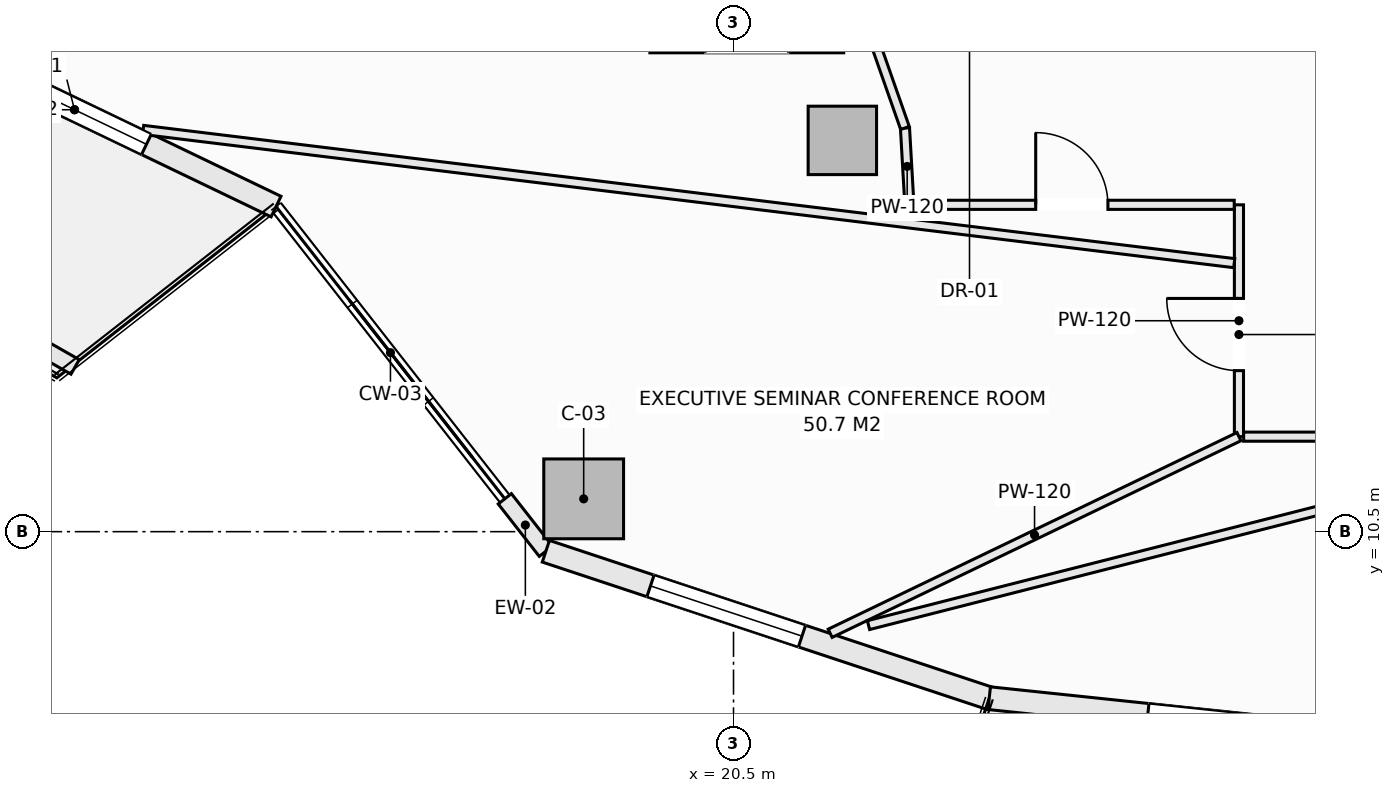
"""IFC4 building model, lengths in metres.
Left out: names, types, materials, properties, quantities, classifications, styles, units other than length and angle.
Written with IfcOpenShell. Run it as: python <this file> out.ifc"""

import sys

from ifc_helpers import new_model, si_unit, direction, frame, frame_2d, origin, origin_2d, place, context, subcontext, project, spatial, rectangle, extrude, element, fill, save


model = new_model("IFC4")
c1 = context("Model", 3, precision=1e-05, world=origin(), true_north=direction((0.0, 1.0)))
c2 = subcontext(c1, "Body", "Model", "MODEL_VIEW")
j1 = project(units=[si_unit("LENGTHUNIT", "METRE"), si_unit("PLANEANGLEUNIT", "RADIAN")], contexts=[c1])
p1 = place(None, origin())
s1 = spatial("IfcSite", under=j1, at=p1, CompositionType="ELEMENT")
p2 = place(p1, origin())
s2 = spatial("IfcBuilding", under=s1, at=p2, CompositionType="ELEMENT")
p3 = place(p2, frame((0.0, 0.0, 122.3)))
s3 = spatial("IfcBuildingStorey", under=s2, at=p3, CompositionType="ELEMENT", Elevation=122.3)
p4 = place(p3, frame((18.529, 10.932, -0.27), z_axis=(0.0, 0.0, 1.0), x_axis=(1.0, 0.0, 0.0)))
e1 = element("IfcColumn", 1, at=p4, inside=s3, PredefinedType="COLUMN", context=c2, shape_type="SweptSolid", body=[
    extrude(rectangle(XDim=1.05, YDim=1.05, at=origin_2d()), origin(), (0.0, 0.0, 1.0), 3.4),
])
p5 = place(p3, frame((21.932, 15.648, -0.27), z_axis=(0.0, 0.0, 1.0), x_axis=(1.0, 0.0, 0.0)))
e2 = element("IfcColumn", 2, at=p5, inside=s3, PredefinedType="COLUMN", context=c2, shape_type="SweptSolid", body=[
    extrude(rectangle(XDim=0.9, YDim=0.9, at=origin_2d()), origin(), (0.0, 0.0, 1.0), 3.4),
])
p6 = place(p3, frame((9.178, 17.325, 0.0), z_axis=(0.0, 0.0, 1.0), x_axis=(0.901370184739, -0.433049408339, 0.0)))
e3 = element("IfcWall", 3, at=p6, inside=s3, PredefinedType="SOLIDWALL", context=c2, shape_type="SweptSolid", body=[
    extrude(rectangle(XDim=5.884, YDim=0.3, at=frame_2d((2.942, 0.0))), origin(), (0.0, 0.0, 1.0), 2.653),
])
p7 = place(p6, frame((1.892, 0.0, 0.74)))
e4 = element("IfcOpeningElement", 4, at=p7, cuts=e3, PredefinedType="OPENING", context=c2, shape_type="SweptSolid", body=[
    extrude(rectangle(XDim=2.1, YDim=1.7, at=frame_2d((1.05, 0.85))), frame((0.0, 0.16, 0.0), z_axis=(0.0, -1.0, 0.0), x_axis=(1.0, 0.0, 0.0)), (0.0, 0.0, 1.0), 0.32),
])
p8 = place(p3, frame((17.491, 10.932, 0.0), z_axis=(0.0, 0.0, 1.0), x_axis=(0.61650363284, -0.787352062736, 0.0)))
e5 = element("IfcWall", 5, at=p8, inside=s3, PredefinedType="SOLIDWALL", context=c2, shape_type="SweptSolid", body=[
    extrude(rectangle(XDim=0.876, YDim=0.22, at=frame_2d((0.438, 0.0))), origin(), (0.0, 0.0, 1.0), 2.653),
])
p9 = place(p3, frame((18.031, 10.242, 0.0), z_axis=(0.0, 0.0, 1.0), x_axis=(0.949238009374, -0.314558741032, 0.0)))
e6 = element("IfcWall", 6, at=p9, inside=s3, PredefinedType="SOLIDWALL", context=c2, shape_type="SweptSolid", body=[
    extrude(rectangle(XDim=6.146, YDim=0.3, at=frame_2d((3.073, 0.0))), origin(), (0.0, 0.0, 1.0), 2.653),
])
p10 = place(p9, frame((1.45, 0.0, 0.74)))
e7 = element("IfcOpeningElement", 7, at=p10, cuts=e6, PredefinedType="OPENING", context=c2, shape_type="SweptSolid", body=[
    extrude(rectangle(XDim=2.1, YDim=1.7, at=frame_2d((1.05, 0.85))), frame((0.0, 0.16, 0.0), z_axis=(0.0, -1.0, 0.0), x_axis=(1.0, 0.0, 0.0)), (0.0, 0.0, 1.0), 0.32),
])
p11 = place(p3, frame((23.865, 8.309, 0.0), z_axis=(0.0, 0.0, 1.0), x_axis=(0.994498012394, -0.104755445421, 0.0)))
e8 = element("IfcWall", 8, at=p11, inside=s3, PredefinedType="SOLIDWALL", context=c2, shape_type="SweptSolid", body=[
    extrude(rectangle(XDim=6.295, YDim=0.3, at=frame_2d((3.147, 0.0))), origin(), (0.0, 0.0, 1.0), 2.653),
])
p12 = place(p11, frame((2.097, 0.0, 0.74)))
e9 = element("IfcOpeningElement", 9, at=p12, cuts=e8, PredefinedType="OPENING", context=c2, shape_type="SweptSolid", body=[
    extrude(rectangle(XDim=2.1, YDim=1.7, at=frame_2d((1.05, 0.85))), frame((0.0, 0.16, 0.0), z_axis=(0.0, -1.0, 0.0), x_axis=(1.0, 0.0, 0.0)), (0.0, 0.0, 1.0), 0.32),
])
p13 = place(p3, frame((6.095, 15.934, 0.0), z_axis=(0.0, 0.0, 1.0), x_axis=(0.869187658335, -0.494482370361, 0.0)))
e10 = element("IfcWall", 10, at=p13, inside=s3, PredefinedType="PARAPET", context=c2, shape_type="SweptSolid", body=[
    extrude(rectangle(XDim=6.606, YDim=0.22, at=frame_2d((3.303, 0.0))), origin(), (0.0, 0.0, 1.0), 0.52),
])
p14 = place(p3, frame((19.4, 16.9, 0.0), z_axis=(0.0, 0.0, 1.0), x_axis=(1.0, 0.0, 0.0)))
e11 = element("IfcWall", 11, at=p14, inside=s3, PredefinedType="SOLIDWALL", context=c2, shape_type="SweptSolid", body=[
    extrude(rectangle(XDim=2.55, YDim=0.2, at=frame_2d((1.275, 0.0))), origin(), (0.0, 0.0, 1.0), 3.13),
])
p15 = place(p14, frame((0.725, 0.0, 0.0)))
e12 = element("IfcOpeningElement", 12, at=p15, cuts=e11, PredefinedType="OPENING", context=c2, shape_type="SweptSolid", body=[
    extrude(rectangle(XDim=1.1, YDim=2.2, at=frame_2d((0.55, 1.1))), frame((0.0, 0.11, 0.0), z_axis=(0.0, -1.0, 0.0), x_axis=(1.0, 0.0, 0.0)), (0.0, 0.0, 1.0), 0.22),
])
p16 = place(p3, frame((27.15, 11.75, 0.0), z_axis=(0.0, 0.0, 1.0), x_axis=(0.0, 1.0, 0.0)))
e13 = element("IfcWall", 13, at=p16, inside=s3, PredefinedType="PARTITIONING", context=c2, shape_type="SweptSolid", body=[
    extrude(rectangle(XDim=3.05, YDim=0.12, at=frame_2d((1.525, 0.0))), origin(), (0.0, 0.0, 1.0), 3.13),
])
p17 = place(p16, frame((0.868, 0.0, 0.0)))
e14 = element("IfcOpeningElement", 14, at=p17, cuts=e13, PredefinedType="OPENING", context=c2, shape_type="SweptSolid", body=[
    extrude(rectangle(XDim=0.95, YDim=2.1, at=frame_2d((0.475, 1.05))), frame((0.0, 0.07, 0.0), z_axis=(0.0, -1.0, 0.0), x_axis=(1.0, 0.0, 0.0)), (0.0, 0.0, 1.0), 0.14),
])
p18 = place(p3, frame((27.212, 11.75, 0.0), z_axis=(0.0, 0.0, 1.0), x_axis=(1.0, 0.0, 0.0)))
e15 = element("IfcWall", 15, at=p18, inside=s3, PredefinedType="PARTITIONING", context=c2, shape_type="SweptSolid", body=[
    extrude(rectangle(XDim=8.676, YDim=0.12, at=frame_2d((4.338, 0.0))), origin(), (0.0, 0.0, 1.0), 3.13),
])
p19 = place(p18, frame((5.693, 0.0, 0.0)))
e16 = element("IfcOpeningElement", 16, at=p19, cuts=e15, PredefinedType="OPENING", context=c2, shape_type="SweptSolid", body=[
    extrude(rectangle(XDim=0.95, YDim=2.1, at=frame_2d((0.475, 1.05))), frame((0.0, 0.07, 0.0), z_axis=(0.0, -1.0, 0.0), x_axis=(1.0, 0.0, 0.0)), (0.0, 0.0, 1.0), 0.14),
])
p20 = place(p3, frame((22.814, 14.8, 0.0), z_axis=(0.0, 0.0, 1.0), x_axis=(1.0, 0.0, 0.0)))
e17 = element("IfcWall", 17, at=p20, inside=s3, PredefinedType="PARTITIONING", context=c2, shape_type="SweptSolid", body=[
    extrude(rectangle(XDim=4.274, YDim=0.12, at=frame_2d((2.137, 0.0))), origin(), (0.0, 0.0, 1.0), 3.13),
])
p21 = place(p20, frame((1.662, 0.0, 0.0)))
e18 = element("IfcOpeningElement", 18, at=p21, cuts=e17, PredefinedType="OPENING", context=c2, shape_type="SweptSolid", body=[
    extrude(rectangle(XDim=0.95, YDim=2.1, at=frame_2d((0.475, 1.05))), frame((0.0, 0.07, 0.0), z_axis=(0.0, -1.0, 0.0), x_axis=(1.0, 0.0, 0.0)), (0.0, 0.0, 1.0), 0.14),
])
p22 = place(p3, frame((22.756, 15.811, 0.0), z_axis=(0.0, 0.0, 1.0), x_axis=(0.057139047697, -0.998366230012, 0.0)))
e19 = element("IfcWall", 19, at=p22, inside=s3, PredefinedType="PARTITIONING", context=c2, shape_type="SweptSolid", body=[
    extrude(rectangle(XDim=1.013, YDim=0.12, at=frame_2d((0.506, 0.0))), origin(), (0.0, 0.0, 1.0), 3.13),
])
p23 = place(p3, frame((22.353, 16.958, 0.0), z_axis=(0.0, 0.0, 1.0), x_axis=(0.331370038458, -0.943500873138, 0.0)))
e20 = element("IfcWall", 20, at=p23, inside=s3, PredefinedType="PARTITIONING", context=c2, shape_type="SweptSolid", body=[
    extrude(rectangle(XDim=1.216, YDim=0.12, at=frame_2d((0.608, 0.0))), origin(), (0.0, 0.0, 1.0), 3.13),
])
p24 = place(p3, frame((12.733, 15.786, 0.0), z_axis=(0.0, 0.0, 1.0), x_axis=(0.992626568422, -0.121212605212, 0.0)))
e21 = element("IfcWall", 21, at=p24, inside=s3, PredefinedType="PARTITIONING", context=c2, shape_type="SweptSolid", body=[
    extrude(rectangle(XDim=14.462, YDim=0.12, at=frame_2d((7.231, 0.0))), origin(), (0.0, 0.0, 1.0), 2.812),
])
p25 = place(p3, frame((21.771, 9.163, 0.0), z_axis=(0.0, 0.0, 1.0), x_axis=(0.901178068668, 0.433449061081, 0.0)))
e22 = element("IfcWall", 22, at=p25, inside=s3, PredefinedType="PARTITIONING", context=c2, shape_type="SweptSolid", body=[
    extrude(rectangle(XDim=5.968, YDim=0.12, at=frame_2d((2.984, 0.0))), origin(), (0.0, 0.0, 1.0), 2.653),
])
p26 = place(p3, frame((22.276, 9.27, 0.0), z_axis=(0.0, 0.0, 1.0), x_axis=(0.969075067926, 0.246766109349, 0.0)))
e23 = element("IfcWall", 23, at=p26, inside=s3, PredefinedType="PARTITIONING", context=c2, shape_type="SweptSolid", body=[
    extrude(rectangle(XDim=9.554, YDim=0.12, at=frame_2d((4.777, 0.0))), origin(), (0.0, 0.0, 1.0), 2.653),
])
p27 = place(p7, origin())
e24 = element("IfcWindow", 24, at=p27, inside=s3, PartitioningType="SINGLE_PANEL", PredefinedType="WINDOW", context=c2, shape_type="SweptSolid", body=[
    extrude(rectangle(XDim=2.1, YDim=1.7, at=frame_2d((1.05, 0.85))), frame((0.0, 0.03, 0.0), z_axis=(0.0, -1.0, 0.0), x_axis=(1.0, 0.0, 0.0)), (0.0, 0.0, 1.0), 0.06),
])
fill(e4, e24)
p28 = place(p10, origin())
e25 = element("IfcWindow", 25, at=p28, inside=s3, PartitioningType="SINGLE_PANEL", PredefinedType="WINDOW", context=c2, shape_type="SweptSolid", body=[
    extrude(rectangle(XDim=2.1, YDim=1.7, at=frame_2d((1.05, 0.85))), frame((0.0, 0.03, 0.0), z_axis=(0.0, -1.0, 0.0), x_axis=(1.0, 0.0, 0.0)), (0.0, 0.0, 1.0), 0.06),
])
fill(e7, e25)
p29 = place(p12, origin())
e26 = element("IfcWindow", 26, at=p29, inside=s3, PartitioningType="SINGLE_PANEL", PredefinedType="WINDOW", context=c2, shape_type="SweptSolid", body=[
    extrude(rectangle(XDim=2.1, YDim=1.7, at=frame_2d((1.05, 0.85))), frame((0.0, 0.03, 0.0), z_axis=(0.0, -1.0, 0.0), x_axis=(1.0, 0.0, 0.0)), (0.0, 0.0, 1.0), 0.06),
])
fill(e9, e26)
p30 = place(p21, origin())
e27 = element("IfcDoor", 27, at=p30, inside=s3, OperationType="SINGLE_SWING_LEFT", PredefinedType="DOOR", context=c2, shape_type="SweptSolid", body=[
    extrude(rectangle(XDim=0.95, YDim=2.1, at=frame_2d((0.475, 1.05))), frame((0.0, 0.025, 0.0), z_axis=(0.0, -1.0, 0.0), x_axis=(1.0, 0.0, 0.0)), (0.0, 0.0, 1.0), 0.05),
])
fill(e18, e27)
p31 = place(p17, origin())
e28 = element("IfcDoor", 28, at=p31, inside=s3, OperationType="SINGLE_SWING_RIGHT", PredefinedType="DOOR", context=c2, shape_type="SweptSolid", body=[
    extrude(rectangle(XDim=0.95, YDim=2.1, at=frame_2d((0.475, 1.05))), frame((0.0, 0.025, 0.0), z_axis=(0.0, -1.0, 0.0), x_axis=(1.0, 0.0, 0.0)), (0.0, 0.0, 1.0), 0.05),
])
fill(e14, e28)
save(model, sys.argv[1])
